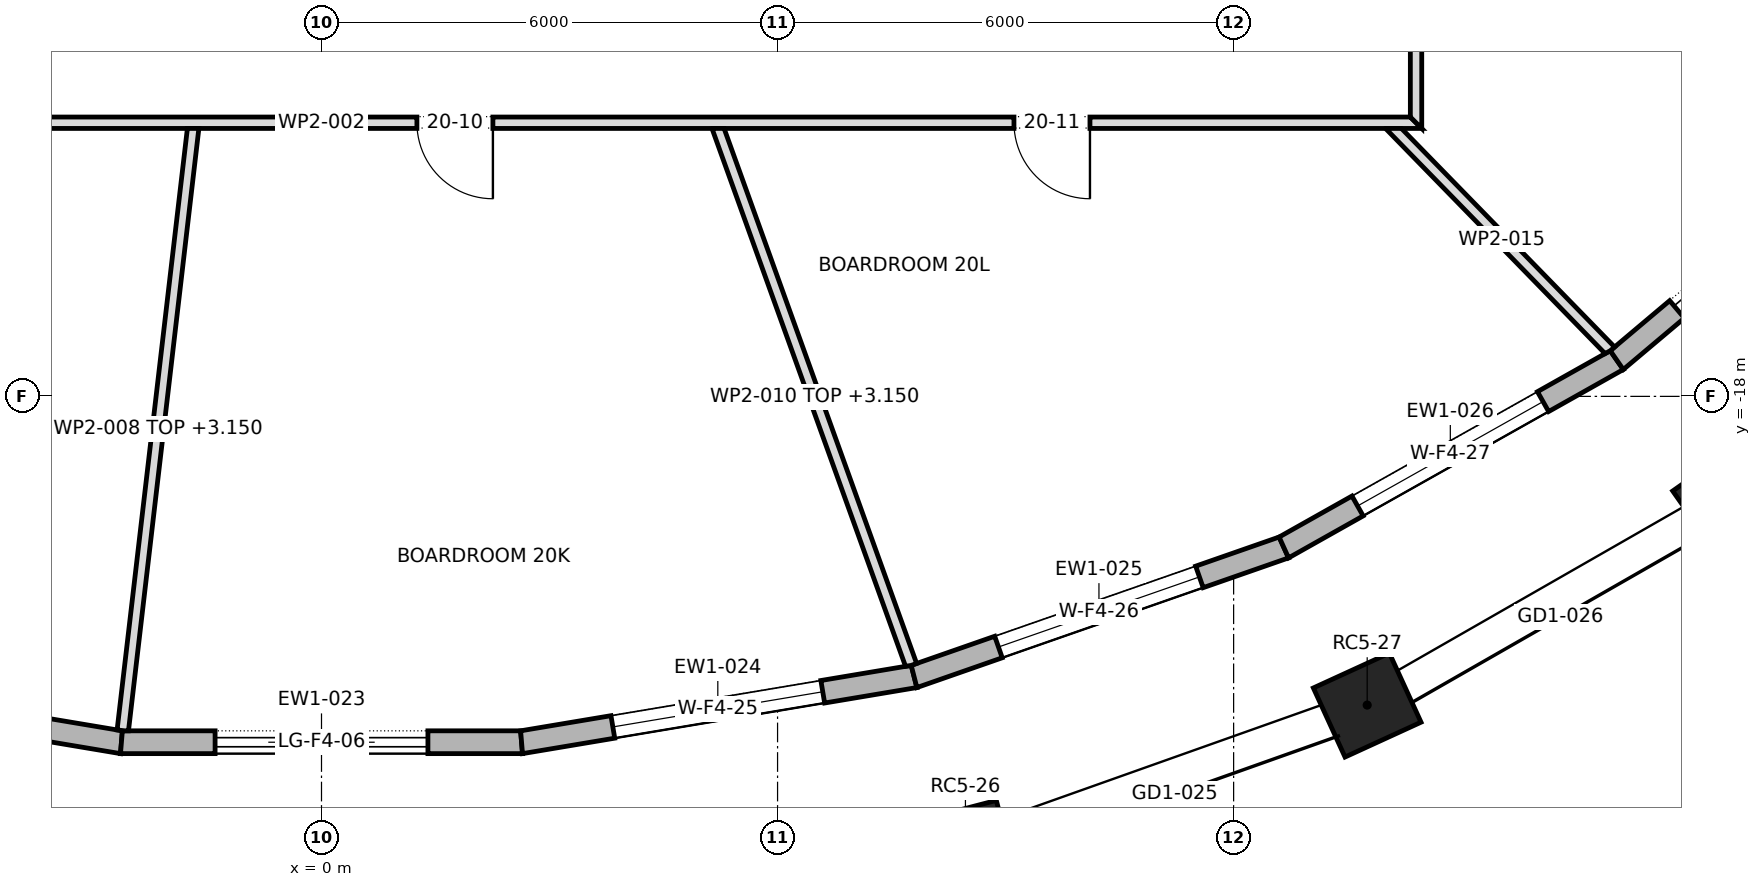
"""IFC4 building model, lengths in metres.
Left out: names, types, materials, properties, quantities, classifications, styles, units other than length and angle.
Written with IfcOpenShell. Run it as: python <this file> out.ifc"""

import sys

from ifc_helpers import new_model, si_unit, direction, frame, frame_2d, origin, origin_2d, place, context, subcontext, project, spatial, polyline, rectangle, outline, extrude, element, fill, save


model = new_model("IFC4")
c1 = context("Model", 3, precision=1e-05, world=origin(), true_north=direction((0.0, 1.0)))
c2 = subcontext(c1, "Body", "Model", "MODEL_VIEW")
j1 = project(units=[si_unit("LENGTHUNIT", "METRE"), si_unit("PLANEANGLEUNIT", "RADIAN")], contexts=[c1])
p1 = place(None, origin())
s1 = spatial("IfcSite", under=j1, at=p1, CompositionType="ELEMENT")
p2 = place(p1, origin())
s2 = spatial("IfcBuilding", under=s1, at=p2, CompositionType="ELEMENT")
p3 = place(p2, frame((0.0, 0.0, 288.3)))
s3 = spatial("IfcBuildingStorey", under=s2, at=p3, CompositionType="ELEMENT", Elevation=288.3)
for number, where, z_axis, x_axis in (
    (1, (8.472, -23.938, 0.0), (0.0, 0.0, 1.0), (0.968, 0.252, 0.0)),
    (2, (13.757, -22.061, 0.0), (0.0, 0.0, 1.0), (0.909, 0.417, 0.0)),
    (3, (18.514, -19.337, 0.0), (0.0, 0.0, 1.0), (0.818, 0.575, 0.0)),
):
    element("IfcColumn", number, at=place(p3, frame(where, z_axis=z_axis, x_axis=x_axis)), inside=s3, PredefinedType="COLUMN", context=c2, shape_type="SweptSolid", body=[
        extrude(rectangle(XDim=1.1, YDim=1.0, at=origin_2d()), origin(), (0.0, 0.0, 1.0), 4.0),
    ])
p4 = place(p3, frame((-7.796, -21.685, 0.0), z_axis=(0.0, 0.0, 1.0), x_axis=(0.986257472007, -0.165215613396, 0.0)))
e4 = element("IfcWall", 4, at=p4, inside=s3, PredefinedType="STANDARD", context=c2, shape_type="SweptSolid", body=[
    extrude(outline(polyline([(-0.013, -0.15), (5.248, -0.15), (5.223, 0.15), (0.013, 0.15), (-0.013, -0.15)])), origin(), (0.0, 0.0, 1.0), 3.7),
])
p5 = place(p4, frame((1.218, 0.0, 0.6)))
e5 = element("IfcOpeningElement", 5, at=p5, cuts=e4, PredefinedType="OPENING", context=c2, shape_type="SweptSolid", body=[
    extrude(rectangle(XDim=2.8, YDim=2.65, at=frame_2d((1.4, 1.325))), frame((0.0, 0.162, 0.0), z_axis=(0.0, -1.0, 0.0), x_axis=(1.0, 0.0, 0.0)), (0.0, 0.0, 1.0), 0.324),
])
p6 = place(p3, frame((-2.632, -22.55, 0.0), z_axis=(0.0, 0.0, 1.0), x_axis=(1.0, 0.0, 0.0)))
e6 = element("IfcWall", 6, at=p6, inside=s3, PredefinedType="STANDARD", context=c2, shape_type="SweptSolid", body=[
    extrude(outline(polyline([(-0.012, -0.15), (5.277, -0.15), (5.252, 0.15), (0.012, 0.15), (-0.012, -0.15)])), origin(), (0.0, 0.0, 1.0), 3.7),
])
p7 = place(p6, frame((1.232, 0.0, 0.0)))
e7 = element("IfcOpeningElement", 7, at=p7, cuts=e6, PredefinedType="OPENING", context=c2, shape_type="SweptSolid", body=[
    extrude(rectangle(XDim=2.8, YDim=3.25, at=frame_2d((1.4, 1.625))), frame((0.0, 0.162, 0.0), z_axis=(0.0, -1.0, 0.0), x_axis=(1.0, 0.0, 0.0)), (0.0, 0.0, 1.0), 0.324),
])
p8 = place(p3, frame((2.632, -22.55, 0.0), z_axis=(0.0, 0.0, 1.0), x_axis=(0.986257472007, 0.165215613396, 0.0)))
e8 = element("IfcWall", 8, at=p8, inside=s3, PredefinedType="STANDARD", context=c2, shape_type="SweptSolid", body=[
    extrude(outline(polyline([(-0.012, -0.15), (5.248, -0.15), (5.223, 0.15), (0.012, 0.15), (-0.012, -0.15)])), origin(), (0.0, 0.0, 1.0), 3.7),
])
p9 = place(p8, frame((1.218, 0.0, 0.6)))
e9 = element("IfcOpeningElement", 9, at=p9, cuts=e8, PredefinedType="OPENING", context=c2, shape_type="SweptSolid", body=[
    extrude(rectangle(XDim=2.8, YDim=2.65, at=frame_2d((1.4, 1.325))), frame((0.0, 0.162, 0.0), z_axis=(0.0, -1.0, 0.0), x_axis=(1.0, 0.0, 0.0)), (0.0, 0.0, 1.0), 0.324),
])
p10 = place(p3, frame((7.796, -21.685, 0.0), z_axis=(0.0, 0.0, 1.0), x_axis=(0.944204293701, 0.329360367617, 0.0)))
e10 = element("IfcWall", 10, at=p10, inside=s3, PredefinedType="STANDARD", context=c2, shape_type="SweptSolid", body=[
    extrude(outline(polyline([(-0.013, -0.15), (5.166, -0.15), (5.139, 0.15), (0.013, 0.15), (-0.013, -0.15)])), origin(), (0.0, 0.0, 1.0), 3.7),
])
p11 = place(p10, frame((1.176, 0.0, 0.6)))
e11 = element("IfcOpeningElement", 11, at=p11, cuts=e10, PredefinedType="OPENING", context=c2, shape_type="SweptSolid", body=[
    extrude(rectangle(XDim=2.8, YDim=2.65, at=frame_2d((1.4, 1.325))), frame((0.0, 0.162, 0.0), z_axis=(0.0, -1.0, 0.0), x_axis=(1.0, 0.0, 0.0)), (0.0, 0.0, 1.0), 0.324),
])
p12 = place(p3, frame((12.661, -19.988, 0.0), z_axis=(0.0, 0.0, 1.0), x_axis=(0.871488606878, 0.490415750239, 0.0)))
e12 = element("IfcWall", 12, at=p12, inside=s3, PredefinedType="STANDARD", context=c2, shape_type="SweptSolid", body=[
    extrude(outline(polyline([(-0.013, -0.15), (5.04, -0.15), (5.012, 0.15), (0.013, 0.15), (-0.013, -0.15)])), origin(), (0.0, 0.0, 1.0), 3.7),
])
p13 = place(p12, frame((1.113, 0.0, 0.6)))
e13 = element("IfcOpeningElement", 13, at=p13, cuts=e12, PredefinedType="OPENING", context=c2, shape_type="SweptSolid", body=[
    extrude(rectangle(XDim=2.8, YDim=2.65, at=frame_2d((1.4, 1.325))), frame((0.0, 0.162, 0.0), z_axis=(0.0, -1.0, 0.0), x_axis=(1.0, 0.0, 0.0)), (0.0, 0.0, 1.0), 0.324),
])
p14 = place(p3, frame((17.041, -17.523, 0.0), z_axis=(0.0, 0.0, 1.0), x_axis=(0.764876116592, 0.644177402792, 0.0)))
e14 = element("IfcWall", 14, at=p14, inside=s3, PredefinedType="STANDARD", context=c2, shape_type="SweptSolid", body=[
    extrude(outline(polyline([(-0.014, -0.15), (4.888, -0.15), (4.858, 0.15), (0.014, 0.15), (-0.014, -0.15)])), origin(), (0.0, 0.0, 1.0), 3.7),
])
p15 = place(p14, frame((1.036, 0.0, 0.0)))
e15 = element("IfcOpeningElement", 15, at=p15, cuts=e14, PredefinedType="OPENING", context=c2, shape_type="SweptSolid", body=[
    extrude(rectangle(XDim=2.8, YDim=3.25, at=frame_2d((1.4, 1.625))), frame((0.0, 0.162, 0.0), z_axis=(0.0, -1.0, 0.0), x_axis=(1.0, 0.0, 0.0)), (0.0, 0.0, 1.0), 0.324),
])
p16 = place(p3, frame((-14.475, -14.4, 0.0), z_axis=(0.0, 0.0, 1.0), x_axis=(1.0, 0.0, 0.0)))
e16 = element("IfcWall", 16, at=p16, inside=s3, PredefinedType="PARTITIONING", context=c2, shape_type="SweptSolid", body=[
    extrude(outline(polyline([(0.0, -0.075), (1.93, -0.075), (3.86, -0.075), (5.79, -0.075), (7.72, -0.075), (9.65, -0.075), (11.58, -0.075), (13.51, -0.075), (15.44, -0.075), (17.37, -0.075), (19.3, -0.075), (21.23, -0.075), (23.16, -0.075), (25.09, -0.075), (27.02, -0.075), (28.95, -0.075), (28.8, 0.075), (26.89, 0.075), (24.98, 0.075), (23.07, 0.075), (21.16, 0.075), (19.25, 0.075), (17.34, 0.075), (15.43, 0.075), (13.52, 0.075), (11.61, 0.075), (9.7, 0.075), (7.79, 0.075), (5.88, 0.075), (3.97, 0.075), (2.06, 0.075), (0.15, 0.075), (0.0, -0.075)])), origin(), (0.0, 0.0, 1.0), 3.7),
])
p17 = place(p16, frame((5.535, 0.0, 0.0)))
e17 = element("IfcOpeningElement", 17, at=p17, cuts=e16, PredefinedType="OPENING", context=c2, shape_type="SweptSolid", body=[
    extrude(rectangle(XDim=1.8, YDim=2.1, at=frame_2d((0.9, 1.05))), frame((0.0, 0.087, 0.0), z_axis=(0.0, -1.0, 0.0), x_axis=(1.0, 0.0, 0.0)), (0.0, 0.0, 1.0), 0.174),
])
p18 = place(p16, frame((15.73, 0.0, 0.0)))
e18 = element("IfcOpeningElement", 18, at=p18, cuts=e16, PredefinedType="OPENING", context=c2, shape_type="SweptSolid", body=[
    extrude(rectangle(XDim=1.0, YDim=2.1, at=frame_2d((0.5, 1.05))), frame((0.0, 0.087, 0.0), z_axis=(0.0, -1.0, 0.0), x_axis=(1.0, 0.0, 0.0)), (0.0, 0.0, 1.0), 0.174),
])
p19 = place(p16, frame((23.585, 0.0, 0.0)))
e19 = element("IfcOpeningElement", 19, at=p19, cuts=e16, PredefinedType="OPENING", context=c2, shape_type="SweptSolid", body=[
    extrude(rectangle(XDim=1.0, YDim=2.1, at=frame_2d((0.5, 1.05))), frame((0.0, 0.087, 0.0), z_axis=(0.0, -1.0, 0.0), x_axis=(1.0, 0.0, 0.0)), (0.0, 0.0, 1.0), 0.174),
])
p20 = place(p3, frame((-1.688, -14.467, 0.0), z_axis=(0.0, 0.0, 1.0), x_axis=(-0.116071250105, -0.993240889663, 0.0)))
e20 = element("IfcWall", 20, at=p20, inside=s3, PredefinedType="PARTITIONING", context=c2, shape_type="SweptSolid", body=[
    extrude(outline(polyline([(7.984, -0.075), (7.984, 0.025), (7.979, 0.075), (5.984, 0.075), (3.989, 0.075), (1.995, 0.075), (0.0, 0.075), (0.0, 0.073), (0.017, -0.075), (2.009, -0.075), (4.001, -0.075), (5.993, -0.075), (7.984, -0.075)])), origin(), (0.0, 0.0, 1.0), 3.15),
])
p21 = place(p3, frame((5.208, -14.45, 0.0), z_axis=(0.0, 0.0, 1.0), x_axis=(0.338585214783, -0.940935732306, 0.0)))
e21 = element("IfcWall", 21, at=p21, inside=s3, PredefinedType="PARTITIONING", context=c2, shape_type="SweptSolid", body=[
    extrude(outline(polyline([(0.0, -0.075), (1.88, -0.075), (3.76, -0.075), (5.64, -0.075), (7.521, -0.075), (7.534, -0.001), (7.534, 0.055), (7.534, 0.075), (5.664, 0.075), (3.794, 0.075), (1.924, 0.075), (0.054, 0.075), (0.0, -0.074), (0.0, -0.075)])), origin(), (0.0, 0.0, 1.0), 3.15),
])
p22 = place(p3, frame((14.4, -14.475, 0.0), z_axis=(0.0, 0.0, 1.0), x_axis=(0.0, 1.0, 0.0)))
e22 = element("IfcWall", 22, at=p22, inside=s3, PredefinedType="PARTITIONING", context=c2, shape_type="SweptSolid", body=[
    extrude(outline(polyline([(0.0, -0.075), (1.93, -0.075), (3.86, -0.075), (5.79, -0.075), (7.72, -0.075), (9.65, -0.075), (11.58, -0.075), (13.51, -0.075), (15.44, -0.075), (17.37, -0.075), (19.3, -0.075), (21.23, -0.075), (23.16, -0.075), (25.09, -0.075), (27.02, -0.075), (28.95, -0.075), (28.8, 0.075), (26.89, 0.075), (24.98, 0.075), (23.07, 0.075), (21.16, 0.075), (19.25, 0.075), (17.34, 0.075), (15.43, 0.075), (13.52, 0.075), (11.61, 0.075), (9.7, 0.075), (7.79, 0.075), (5.88, 0.075), (3.97, 0.075), (2.06, 0.075), (0.15, 0.075), (0.0, -0.075)])), origin(), (0.0, 0.0, 1.0), 3.7),
])
p23 = place(p22, frame((3.535, 0.0, 0.0)))
e23 = element("IfcOpeningElement", 23, at=p23, cuts=e22, PredefinedType="OPENING", context=c2, shape_type="SweptSolid", body=[
    extrude(rectangle(XDim=1.0, YDim=2.1, at=frame_2d((0.5, 1.05))), frame((0.0, 0.087, 0.0), z_axis=(0.0, -1.0, 0.0), x_axis=(1.0, 0.0, 0.0)), (0.0, 0.0, 1.0), 0.174),
])
p24 = place(p22, frame((10.14, 0.0, 0.0)))
e24 = element("IfcOpeningElement", 24, at=p24, cuts=e22, PredefinedType="OPENING", context=c2, shape_type="SweptSolid", body=[
    extrude(rectangle(XDim=1.0, YDim=2.1, at=frame_2d((0.5, 1.05))), frame((0.0, 0.087, 0.0), z_axis=(0.0, -1.0, 0.0), x_axis=(1.0, 0.0, 0.0)), (0.0, 0.0, 1.0), 0.174),
])
p25 = place(p22, frame((20.18, 0.0, 0.0)))
e25 = element("IfcOpeningElement", 25, at=p25, cuts=e22, PredefinedType="OPENING", context=c2, shape_type="SweptSolid", body=[
    extrude(rectangle(XDim=1.8, YDim=2.1, at=frame_2d((0.9, 1.05))), frame((0.0, 0.087, 0.0), z_axis=(0.0, -1.0, 0.0), x_axis=(1.0, 0.0, 0.0)), (0.0, 0.0, 1.0), 0.174),
])
p26 = place(p3, frame((16.958, -17.403, 0.0), z_axis=(0.0, 0.0, 1.0), x_axis=(-0.698164782934, 0.715937103293, 0.0)))
e26 = element("IfcWall", 26, at=p26, inside=s3, PredefinedType="PARTITIONING", context=c2, shape_type="SweptSolid", body=[
    extrude(outline(polyline([(0.0, -0.075), (1.339, -0.075), (2.678, -0.075), (4.016, -0.075), (4.069, -0.021), (4.069, -0.021), (4.162, 0.075), (4.162, 0.075), (2.783, 0.075), (1.404, 0.075), (0.025, 0.075), (0.005, -0.0), (0.0, -0.067), (0.0, -0.075)])), origin(), (0.0, 0.0, 1.0), 3.7),
])
p27 = place(p7, origin())
e27 = element("IfcDoor", 27, at=p27, inside=s3, OperationType="DOUBLE_DOOR_SLIDING", PredefinedType="DOOR", context=c2, shape_type="SweptSolid", body=[
    extrude(rectangle(XDim=2.8, YDim=3.25, at=frame_2d((1.4, 1.625))), frame((0.0, 0.025, 0.0), z_axis=(0.0, -1.0, 0.0), x_axis=(1.0, 0.0, 0.0)), (0.0, 0.0, 1.0), 0.05),
])
fill(e7, e27)
p28 = place(p9, origin())
e28 = element("IfcWindow", 28, at=p28, inside=s3, PartitioningType="DOUBLE_PANEL_VERTICAL", PredefinedType="WINDOW", context=c2, shape_type="SweptSolid", body=[
    extrude(rectangle(XDim=2.8, YDim=2.65, at=frame_2d((1.4, 1.325))), frame((0.0, 0.03, 0.0), z_axis=(0.0, -1.0, 0.0), x_axis=(1.0, 0.0, 0.0)), (0.0, 0.0, 1.0), 0.06),
])
fill(e9, e28)
p29 = place(p11, origin())
e29 = element("IfcWindow", 29, at=p29, inside=s3, PartitioningType="DOUBLE_PANEL_VERTICAL", PredefinedType="WINDOW", context=c2, shape_type="SweptSolid", body=[
    extrude(rectangle(XDim=2.8, YDim=2.65, at=frame_2d((1.4, 1.325))), frame((0.0, 0.03, 0.0), z_axis=(0.0, -1.0, 0.0), x_axis=(1.0, 0.0, 0.0)), (0.0, 0.0, 1.0), 0.06),
])
fill(e11, e29)
p30 = place(p13, origin())
e30 = element("IfcWindow", 30, at=p30, inside=s3, PartitioningType="DOUBLE_PANEL_VERTICAL", PredefinedType="WINDOW", context=c2, shape_type="SweptSolid", body=[
    extrude(rectangle(XDim=2.8, YDim=2.65, at=frame_2d((1.4, 1.325))), frame((0.0, 0.03, 0.0), z_axis=(0.0, -1.0, 0.0), x_axis=(1.0, 0.0, 0.0)), (0.0, 0.0, 1.0), 0.06),
])
fill(e13, e30)
p31 = place(p15, origin())
e31 = element("IfcDoor", 31, at=p31, inside=s3, OperationType="DOUBLE_DOOR_SLIDING", PredefinedType="DOOR", context=c2, shape_type="SweptSolid", body=[
    extrude(rectangle(XDim=2.8, YDim=3.25, at=frame_2d((1.4, 1.625))), frame((0.0, 0.025, 0.0), z_axis=(0.0, -1.0, 0.0), x_axis=(1.0, 0.0, 0.0)), (0.0, 0.0, 1.0), 0.05),
])
fill(e15, e31)
p32 = place(p18, frame((1.0, 0.0, 0.0), z_axis=(0.0, 0.0, 1.0), x_axis=(-1.0, 0.0, 0.0)))
e32 = element("IfcDoor", 32, at=p32, inside=s3, OperationType="SINGLE_SWING_RIGHT", PredefinedType="DOOR", context=c2, shape_type="SweptSolid", body=[
    extrude(rectangle(XDim=1.0, YDim=2.1, at=frame_2d((0.5, 1.05))), frame((0.0, 0.025, 0.0), z_axis=(0.0, -1.0, 0.0), x_axis=(1.0, 0.0, 0.0)), (0.0, 0.0, 1.0), 0.05),
])
fill(e18, e32)
p33 = place(p19, frame((1.0, 0.0, 0.0), z_axis=(0.0, 0.0, 1.0), x_axis=(-1.0, 0.0, 0.0)))
e33 = element("IfcDoor", 33, at=p33, inside=s3, OperationType="SINGLE_SWING_RIGHT", PredefinedType="DOOR", context=c2, shape_type="SweptSolid", body=[
    extrude(rectangle(XDim=1.0, YDim=2.1, at=frame_2d((0.5, 1.05))), frame((0.0, 0.025, 0.0), z_axis=(0.0, -1.0, 0.0), x_axis=(1.0, 0.0, 0.0)), (0.0, 0.0, 1.0), 0.05),
])
fill(e19, e33)
save(model, sys.argv[1])
